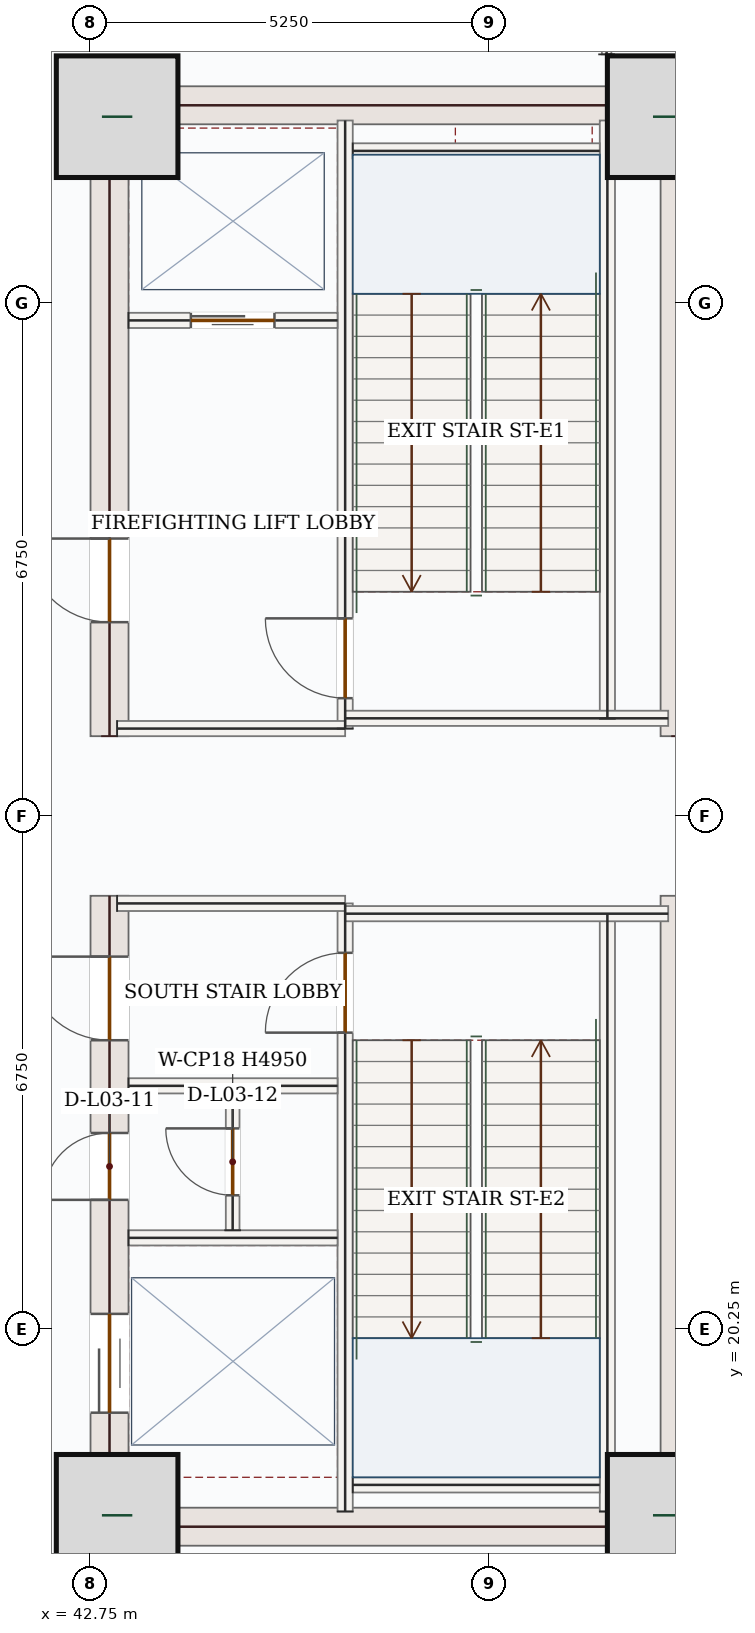
"""IFC4 building model, lengths in metres.
Left out: names, types, materials, properties, quantities, classifications, styles, units other than length and angle.
Written with IfcOpenShell. Run it as: python <this file> out.ifc"""

import sys

from ifc_helpers import new_model, si_unit, direction, frame, frame_2d, origin, origin_2d, place, context, subcontext, project, spatial, rectangle, extrude, source, transform, mapped, element, fill, save


model = new_model("IFC4")
c1 = context("Model", 3, precision=1e-05, world=origin(), true_north=direction((0.0, 1.0)))
c2 = subcontext(c1, "Body", "Model", "MODEL_VIEW")
j1 = project(units=[si_unit("LENGTHUNIT", "METRE"), si_unit("PLANEANGLEUNIT", "RADIAN")], contexts=[c1])
p1 = place(None, origin())
s1 = spatial("IfcSite", under=j1, at=p1, CompositionType="ELEMENT")
p2 = place(p1, origin())
s2 = spatial("IfcBuilding", under=s1, at=p2, CompositionType="ELEMENT")
p3 = place(p2, frame((0.0, 0.0, 18.0)))
s3 = spatial("IfcBuildingStorey", under=s2, at=p3, CompositionType="ELEMENT", Elevation=18.0)
p4 = place(p3, frame((43.0, 17.4, 0.0), z_axis=(0.0, 0.0, 1.0), x_axis=(0.0, 1.0, 0.0)))
e1 = element("IfcWall", 1, at=p4, inside=s3, PredefinedType="SHEAR", context=c2, shape_type="SweptSolid", body=[
    extrude(rectangle(XDim=8.55, YDim=0.5, at=frame_2d((4.275, 0.0))), origin(), (0.0, 0.0, 1.0), 4.95),
])
p5 = place(p4, frame((6.65, 0.0, 0.0)))
e2 = element("IfcOpeningElement", 2, at=p5, cuts=e1, PredefinedType="OPENING", context=c2, shape_type="SweptSolid", body=[
    extrude(rectangle(XDim=1.1, YDim=2.2, at=frame_2d((0.55, 1.1))), frame((0.0, 0.26, 0.0), z_axis=(0.0, -1.0, 0.0), x_axis=(1.0, 0.0, 0.0)), (0.0, 0.0, 1.0), 0.52),
])
p6 = place(p4, frame((1.75, 0.0, 0.0)))
e3 = element("IfcOpeningElement", 3, at=p6, cuts=e1, PredefinedType="OPENING", context=c2, shape_type="SweptSolid", body=[
    extrude(rectangle(XDim=1.3, YDim=2.2, at=frame_2d((0.65, 1.1))), frame((0.0, 0.26, 0.0), z_axis=(0.0, -1.0, 0.0), x_axis=(1.0, 0.0, 0.0)), (0.0, 0.0, 1.0), 0.52),
])
p7 = place(p4, frame((4.55, 0.0, 0.0)))
e4 = element("IfcOpeningElement", 4, at=p7, cuts=e1, PredefinedType="OPENING", context=c2, shape_type="SweptSolid", body=[
    extrude(rectangle(XDim=0.88, YDim=2.1, at=frame_2d((0.44, 1.05))), frame((0.0, 0.26, 0.0), z_axis=(0.0, -1.0, 0.0), x_axis=(1.0, 0.0, 0.0)), (0.0, 0.0, 1.0), 0.52),
])
p8 = place(p3, frame((43.0, 28.05, 0.0), z_axis=(0.0, 0.0, 1.0), x_axis=(0.0, 1.0, 0.0)))
e5 = element("IfcWall", 5, at=p8, inside=s3, PredefinedType="SHEAR", context=c2, shape_type="SweptSolid", body=[
    extrude(rectangle(XDim=8.55, YDim=0.5, at=frame_2d((4.275, 0.0))), origin(), (0.0, 0.0, 1.0), 4.95),
])
p9 = place(p8, frame((1.5, 0.0, 0.0)))
e6 = element("IfcOpeningElement", 6, at=p9, cuts=e5, PredefinedType="OPENING", context=c2, shape_type="SweptSolid", body=[
    extrude(rectangle(XDim=1.1, YDim=2.2, at=frame_2d((0.55, 1.1))), frame((0.0, 0.26, 0.0), z_axis=(0.0, -1.0, 0.0), x_axis=(1.0, 0.0, 0.0)), (0.0, 0.0, 1.0), 0.52),
])
m1 = source(origin(), c2, "Body", "SweptSolid", [
    extrude(rectangle(XDim=8.55, YDim=0.5, at=frame_2d((4.275, 0.0))), origin(), (0.0, 0.0, 1.0), 4.95),
])
for number, where, z_axis, x_axis in (
    (7, (50.5, 17.4, 0.0), (0.0, 0.0, 1.0), (0.0, 1.0, 0.0)),
    (8, (50.5, 28.05, 0.0), (0.0, 0.0, 1.0), (0.0, 1.0, 0.0)),
):
    element("IfcWall", number, at=place(p3, frame(where, z_axis=z_axis, x_axis=x_axis)), inside=s3, PredefinedType="SHEAR", context=c2, shape_type="MappedRepresentation", body=[
        mapped(m1, transform((0.0, 0.0, 0.0), x_axis=(1.0, 0.0, 0.0), y_axis=(0.0, 1.0, 0.0), z_axis=(0.0, 0.0, 1.0), scale=1.0)),
    ])
m2 = source(origin(), c2, "Body", "SweptSolid", [
    extrude(rectangle(XDim=7.0, YDim=0.5, at=frame_2d((3.5, 0.0))), origin(), (0.0, 0.0, 1.0), 4.95),
])
for number, where, z_axis, x_axis in (
    (9, (43.25, 17.65, 0.0), (0.0, 0.0, 1.0), (1.0, 0.0, 0.0)),
    (10, (43.25, 36.35, 0.0), (0.0, 0.0, 1.0), (1.0, 0.0, 0.0)),
):
    element("IfcWall", number, at=place(p3, frame(where, z_axis=z_axis, x_axis=x_axis)), inside=s3, PredefinedType="SHEAR", context=c2, shape_type="MappedRepresentation", body=[
        mapped(m2, transform((0.0, 0.0, 0.0), x_axis=(1.0, 0.0, 0.0), y_axis=(0.0, 1.0, 0.0), z_axis=(0.0, 0.0, 1.0), scale=1.0)),
    ])
m3 = source(origin(), c2, "Body", "SweptSolid", [
    extrude(rectangle(XDim=1.6, YDim=1.6, at=origin_2d()), origin(), (0.0, 0.0, 1.0), 5.4),
])
for number, where, z_axis, x_axis in (
    (11, (43.1, 17.8, 0.0), (0.0, 0.0, 1.0), (1.0, 0.0, 0.0)),
    (12, (50.35, 17.8, 0.0), (0.0, 0.0, 1.0), (1.0, 0.0, 0.0)),
    (13, (43.1, 36.2, 0.0), (0.0, 0.0, 1.0), (1.0, 0.0, 0.0)),
    (14, (50.35, 36.2, 0.0), (0.0, 0.0, 1.0), (1.0, 0.0, 0.0)),
):
    element("IfcColumn", number, at=place(p3, frame(where, z_axis=z_axis, x_axis=x_axis)), inside=s3, PredefinedType="COLUMN", context=c2, shape_type="MappedRepresentation", body=[
        mapped(m3, transform((0.0, 0.0, 0.0), x_axis=(1.0, 0.0, 0.0), y_axis=(0.0, 1.0, 0.0), z_axis=(0.0, 0.0, 1.0), scale=1.0)),
    ])
m4 = source(origin(), c2, "Body", "SweptSolid", [
    extrude(rectangle(XDim=7.87, YDim=0.2, at=frame_2d((3.935, 0.0))), origin(), (0.0, 0.0, 1.0), 4.95),
])
for number, where, z_axis, x_axis in (
    (15, (49.55, 17.85, 0.0), (0.0, 0.0, 1.0), (0.0, 1.0, 0.0)),
    (16, (49.55, 28.28, 0.0), (0.0, 0.0, 1.0), (0.0, 1.0, 0.0)),
):
    element("IfcWall", number, at=place(p3, frame(where, z_axis=z_axis, x_axis=x_axis)), inside=s3, PredefinedType="SOLIDWALL", context=c2, shape_type="MappedRepresentation", body=[
        mapped(m4, transform((0.0, 0.0, 0.0), x_axis=(1.0, 0.0, 0.0), y_axis=(0.0, 1.0, 0.0), z_axis=(0.0, 0.0, 1.0), scale=1.0)),
    ])
p10 = place(p3, frame((46.1, 17.85, 0.0), z_axis=(0.0, 0.0, 1.0), x_axis=(0.0, 1.0, 0.0)))
e17 = element("IfcWall", 17, at=p10, inside=s3, PredefinedType="SOLIDWALL", context=c2, shape_type="SweptSolid", body=[
    extrude(rectangle(XDim=8.0, YDim=0.2, at=frame_2d((4.0, 0.0))), origin(), (0.0, 0.0, 1.0), 4.95),
])
p11 = place(p10, frame((6.3, 0.0, 0.0)))
e18 = element("IfcOpeningElement", 18, at=p11, cuts=e17, PredefinedType="OPENING", context=c2, shape_type="SweptSolid", body=[
    extrude(rectangle(XDim=1.05, YDim=2.15, at=frame_2d((0.525, 1.075))), frame((0.0, 0.11, 0.0), z_axis=(0.0, -1.0, 0.0), x_axis=(1.0, 0.0, 0.0)), (0.0, 0.0, 1.0), 0.22),
])
p12 = place(p3, frame((46.1, 28.15, 0.0), z_axis=(0.0, 0.0, 1.0), x_axis=(0.0, 1.0, 0.0)))
e19 = element("IfcWall", 19, at=p12, inside=s3, PredefinedType="SOLIDWALL", context=c2, shape_type="SweptSolid", body=[
    extrude(rectangle(XDim=8.0, YDim=0.2, at=frame_2d((4.0, 0.0))), origin(), (0.0, 0.0, 1.0), 4.95),
])
p13 = place(p12, frame((0.4, 0.0, 0.0)))
e20 = element("IfcOpeningElement", 20, at=p13, cuts=e19, PredefinedType="OPENING", context=c2, shape_type="SweptSolid", body=[
    extrude(rectangle(XDim=1.05, YDim=2.15, at=frame_2d((0.525, 1.075))), frame((0.0, 0.11, 0.0), z_axis=(0.0, -1.0, 0.0), x_axis=(1.0, 0.0, 0.0)), (0.0, 0.0, 1.0), 0.22),
])
m5 = source(origin(), c2, "Body", "SweptSolid", [
    extrude(rectangle(XDim=3.0, YDim=0.2, at=frame_2d((1.5, 0.0))), origin(), (0.0, 0.0, 1.0), 4.95),
])
p14 = place(p3, frame((43.1, 25.85, 0.0), z_axis=(0.0, 0.0, 1.0), x_axis=(1.0, 0.0, 0.0)))
e21 = element("IfcWall", 21, at=p14, inside=s3, PredefinedType="SOLIDWALL", context=c2, shape_type="MappedRepresentation", body=[
    mapped(m5, transform((0.0, 0.0, 0.0), x_axis=(1.0, 0.0, 0.0), y_axis=(0.0, 1.0, 0.0), z_axis=(0.0, 0.0, 1.0), scale=1.0)),
])
m6 = source(origin(), c2, "Body", "SweptSolid", [
    extrude(rectangle(XDim=4.25, YDim=0.2, at=frame_2d((2.125, 0.0))), origin(), (0.0, 0.0, 1.0), 4.95),
])
p15 = place(p3, frame((46.1, 25.715, 0.0), z_axis=(0.0, 0.0, 1.0), x_axis=(1.0, 0.0, 0.0)))
e22 = element("IfcWall", 22, at=p15, inside=s3, PredefinedType="SOLIDWALL", context=c2, shape_type="MappedRepresentation", body=[
    mapped(m6, transform((0.0, 0.0, 0.0), x_axis=(1.0, 0.0, 0.0), y_axis=(0.0, 1.0, 0.0), z_axis=(0.0, 0.0, 1.0), scale=1.0)),
])
p16 = place(p3, frame((43.1, 28.15, 0.0), z_axis=(0.0, 0.0, 1.0), x_axis=(1.0, 0.0, 0.0)))
e23 = element("IfcWall", 23, at=p16, inside=s3, PredefinedType="SOLIDWALL", context=c2, shape_type="MappedRepresentation", body=[
    mapped(m5, transform((0.0, 0.0, 0.0), x_axis=(1.0, 0.0, 0.0), y_axis=(0.0, 1.0, 0.0), z_axis=(0.0, 0.0, 1.0), scale=1.0)),
])
p17 = place(p3, frame((46.1, 28.285, 0.0), z_axis=(0.0, 0.0, 1.0), x_axis=(1.0, 0.0, 0.0)))
e24 = element("IfcWall", 24, at=p17, inside=s3, PredefinedType="SOLIDWALL", context=c2, shape_type="MappedRepresentation", body=[
    mapped(m6, transform((0.0, 0.0, 0.0), x_axis=(1.0, 0.0, 0.0), y_axis=(0.0, 1.0, 0.0), z_axis=(0.0, 0.0, 1.0), scale=1.0)),
])
m7 = source(origin(), c2, "Body", "SweptSolid", [
    extrude(rectangle(XDim=3.25, YDim=0.2, at=frame_2d((1.625, 0.0))), origin(), (0.0, 0.0, 1.0), 4.95),
])
for number, where, z_axis, x_axis in (
    (25, (46.2, 35.75, 0.0), (0.0, 0.0, 1.0), (1.0, 0.0, 0.0)),
    (26, (46.2, 18.2, 0.0), (0.0, 0.0, 1.0), (1.0, 0.0, 0.0)),
):
    element("IfcWall", number, at=place(p3, frame(where, z_axis=z_axis, x_axis=x_axis)), inside=s3, PredefinedType="SOLIDWALL", context=c2, shape_type="MappedRepresentation", body=[
        mapped(m7, transform((0.0, 0.0, 0.0), x_axis=(1.0, 0.0, 0.0), y_axis=(0.0, 1.0, 0.0), z_axis=(0.0, 0.0, 1.0), scale=1.0)),
    ])
p18 = place(p3, frame((43.25, 33.52, 0.0), z_axis=(0.0, 0.0, 1.0), x_axis=(1.0, 0.0, 0.0)))
e27 = element("IfcWall", 27, at=p18, inside=s3, PredefinedType="SOLIDWALL", context=c2, shape_type="SweptSolid", body=[
    extrude(rectangle(XDim=2.75, YDim=0.2, at=frame_2d((1.375, 0.0))), origin(), (0.0, 0.0, 1.0), 4.95),
])
p19 = place(p18, frame((0.82, 0.0, 0.0)))
e28 = element("IfcOpeningElement", 28, at=p19, cuts=e27, PredefinedType="OPENING", context=c2, shape_type="SweptSolid", body=[
    extrude(rectangle(XDim=1.1, YDim=2.15, at=frame_2d((0.55, 1.075))), frame((0.0, 0.11, 0.0), z_axis=(0.0, -1.0, 0.0), x_axis=(1.0, 0.0, 0.0)), (0.0, 0.0, 1.0), 0.22),
])
m8 = source(origin(), c2, "Body", "SweptSolid", [
    extrude(rectangle(XDim=2.75, YDim=0.2, at=frame_2d((1.375, 0.0))), origin(), (0.0, 0.0, 1.0), 4.95),
])
for number, where, z_axis, x_axis in (
    (29, (43.25, 23.45, 0.0), (0.0, 0.0, 1.0), (1.0, 0.0, 0.0)),
    (30, (43.25, 21.45, 0.0), (0.0, 0.0, 1.0), (1.0, 0.0, 0.0)),
):
    element("IfcWall", number, at=place(p3, frame(where, z_axis=z_axis, x_axis=x_axis)), inside=s3, PredefinedType="SOLIDWALL", context=c2, shape_type="MappedRepresentation", body=[
        mapped(m8, transform((0.0, 0.0, 0.0), x_axis=(1.0, 0.0, 0.0), y_axis=(0.0, 1.0, 0.0), z_axis=(0.0, 0.0, 1.0), scale=1.0)),
    ])
p20 = place(p3, frame((44.62, 21.55, 0.0), z_axis=(0.0, 0.0, 1.0), x_axis=(0.0, 1.0, 0.0)))
e31 = element("IfcWall", 31, at=p20, inside=s3, PredefinedType="PARTITIONING", context=c2, shape_type="SweptSolid", body=[
    extrude(rectangle(XDim=1.8, YDim=0.18, at=frame_2d((0.9, 0.0))), origin(), (0.0, 0.0, 1.0), 4.95),
])
p21 = place(p20, frame((0.46, 0.0, 0.0)))
e32 = element("IfcOpeningElement", 32, at=p21, cuts=e31, PredefinedType="OPENING", context=c2, shape_type="SweptSolid", body=[
    extrude(rectangle(XDim=0.88, YDim=2.1, at=frame_2d((0.44, 1.05))), frame((0.0, 0.1, 0.0), z_axis=(0.0, -1.0, 0.0), x_axis=(1.0, 0.0, 0.0)), (0.0, 0.0, 1.0), 0.2),
])
m9 = source(origin(), c2, "Body", "SweptSolid", [
    extrude(rectangle(XDim=1.832, YDim=0.125, at=frame_2d((0.916, 0.0))), origin(), (0.0, 0.0, 1.0), 4.95),
])
p22 = place(p3, frame((49.54, 37.02, 0.0), z_axis=(0.0, 0.0, 1.0), x_axis=(-0.000133244502, 0.999999991123, 0.0)))
e33 = element("IfcWall", 33, at=p22, inside=s3, PredefinedType="PARTITIONING", context=c2, shape_type="MappedRepresentation", body=[
    mapped(m9, transform((0.0, 0.0, 0.0), x_axis=(1.0, 0.0, 0.0), y_axis=(0.0, 1.0, 0.0), z_axis=(0.0, 0.0, 1.0), scale=1.0)),
])
m10 = source(origin(), c2, "Body", "SweptSolid", [
    extrude(rectangle(XDim=1.05, YDim=2.15, at=frame_2d((0.525, 1.075))), frame((0.0, 0.025, 0.0), z_axis=(0.0, -1.0, 0.0), x_axis=(1.0, 0.0, 0.0)), (0.0, 0.0, 1.0), 0.05),
])
p23 = place(p13, origin())
e34 = element("IfcDoor", 34, at=p23, inside=s3, OperationType="SINGLE_SWING_RIGHT", PredefinedType="DOOR", context=c2, shape_type="MappedRepresentation", body=[
    mapped(m10, transform((0.0, 0.0, 0.0), x_axis=(1.0, 0.0, 0.0), y_axis=(0.0, 1.0, 0.0), z_axis=(0.0, 0.0, 1.0), scale=1.0)),
])
fill(e20, e34)
p24 = place(p11, origin())
e35 = element("IfcDoor", 35, at=p24, inside=s3, OperationType="SINGLE_SWING_LEFT", PredefinedType="DOOR", context=c2, shape_type="MappedRepresentation", body=[
    mapped(m10, transform((0.0, 0.0, 0.0), x_axis=(1.0, 0.0, 0.0), y_axis=(0.0, 1.0, 0.0), z_axis=(0.0, 0.0, 1.0), scale=1.0)),
])
fill(e18, e35)
m11 = source(origin(), c2, "Body", "SweptSolid", [
    extrude(rectangle(XDim=1.1, YDim=2.15, at=frame_2d((0.55, 1.075))), frame((0.0, 0.025, 0.0), z_axis=(0.0, -1.0, 0.0), x_axis=(1.0, 0.0, 0.0)), (0.0, 0.0, 1.0), 0.05),
])
p25 = place(p19, origin())
e36 = element("IfcDoor", 36, at=p25, inside=s3, OperationType="DOUBLE_DOOR_SLIDING", PredefinedType="DOOR", context=c2, shape_type="MappedRepresentation", body=[
    mapped(m11, transform((0.0, 0.0, 0.0), x_axis=(1.0, 0.0, 0.0), y_axis=(0.0, 1.0, 0.0), z_axis=(0.0, 0.0, 1.0), scale=1.0)),
])
fill(e28, e36)
m12 = source(origin(), c2, "Body", "SweptSolid", [
    extrude(rectangle(XDim=1.1, YDim=2.2, at=frame_2d((0.55, 1.1))), frame((0.0, 0.025, 0.0), z_axis=(0.0, -1.0, 0.0), x_axis=(1.0, 0.0, 0.0)), (0.0, 0.0, 1.0), 0.05),
])
p26 = place(p9, origin())
e37 = element("IfcDoor", 37, at=p26, inside=s3, OperationType="SINGLE_SWING_RIGHT", PredefinedType="DOOR", context=c2, shape_type="MappedRepresentation", body=[
    mapped(m12, transform((0.0, 0.0, 0.0), x_axis=(1.0, 0.0, 0.0), y_axis=(0.0, 1.0, 0.0), z_axis=(0.0, 0.0, 1.0), scale=1.0)),
])
fill(e6, e37)
p27 = place(p5, origin())
e38 = element("IfcDoor", 38, at=p27, inside=s3, OperationType="SINGLE_SWING_RIGHT", PredefinedType="DOOR", context=c2, shape_type="MappedRepresentation", body=[
    mapped(m12, transform((0.0, 0.0, 0.0), x_axis=(1.0, 0.0, 0.0), y_axis=(0.0, 1.0, 0.0), z_axis=(0.0, 0.0, 1.0), scale=1.0)),
])
fill(e2, e38)
m13 = source(origin(), c2, "Body", "SweptSolid", [
    extrude(rectangle(XDim=1.3, YDim=2.2, at=frame_2d((0.65, 1.1))), frame((0.0, 0.025, 0.0), z_axis=(0.0, -1.0, 0.0), x_axis=(1.0, 0.0, 0.0)), (0.0, 0.0, 1.0), 0.05),
])
p28 = place(p6, origin())
e39 = element("IfcDoor", 39, at=p28, inside=s3, OperationType="DOUBLE_DOOR_SLIDING", PredefinedType="DOOR", context=c2, shape_type="MappedRepresentation", body=[
    mapped(m13, transform((0.0, 0.0, 0.0), x_axis=(1.0, 0.0, 0.0), y_axis=(0.0, 1.0, 0.0), z_axis=(0.0, 0.0, 1.0), scale=1.0)),
])
fill(e3, e39)
m14 = source(origin(), c2, "Body", "SweptSolid", [
    extrude(rectangle(XDim=0.88, YDim=2.1, at=frame_2d((0.44, 1.05))), frame((0.0, 0.025, 0.0), z_axis=(0.0, -1.0, 0.0), x_axis=(1.0, 0.0, 0.0)), (0.0, 0.0, 1.0), 0.05),
])
p29 = place(p7, origin())
e40 = element("IfcDoor", 40, at=p29, inside=s3, OperationType="SINGLE_SWING_LEFT", PredefinedType="DOOR", context=c2, shape_type="MappedRepresentation", body=[
    mapped(m14, transform((0.0, 0.0, 0.0), x_axis=(1.0, 0.0, 0.0), y_axis=(0.0, 1.0, 0.0), z_axis=(0.0, 0.0, 1.0), scale=1.0)),
])
fill(e4, e40)
p30 = place(p21, origin())
e41 = element("IfcDoor", 41, at=p30, inside=s3, OperationType="SINGLE_SWING_RIGHT", PredefinedType="DOOR", context=c2, shape_type="MappedRepresentation", body=[
    mapped(m14, transform((0.0, 0.0, 0.0), x_axis=(1.0, 0.0, 0.0), y_axis=(0.0, 1.0, 0.0), z_axis=(0.0, 0.0, 1.0), scale=1.0)),
])
fill(e32, e41)
save(model, sys.argv[1])
